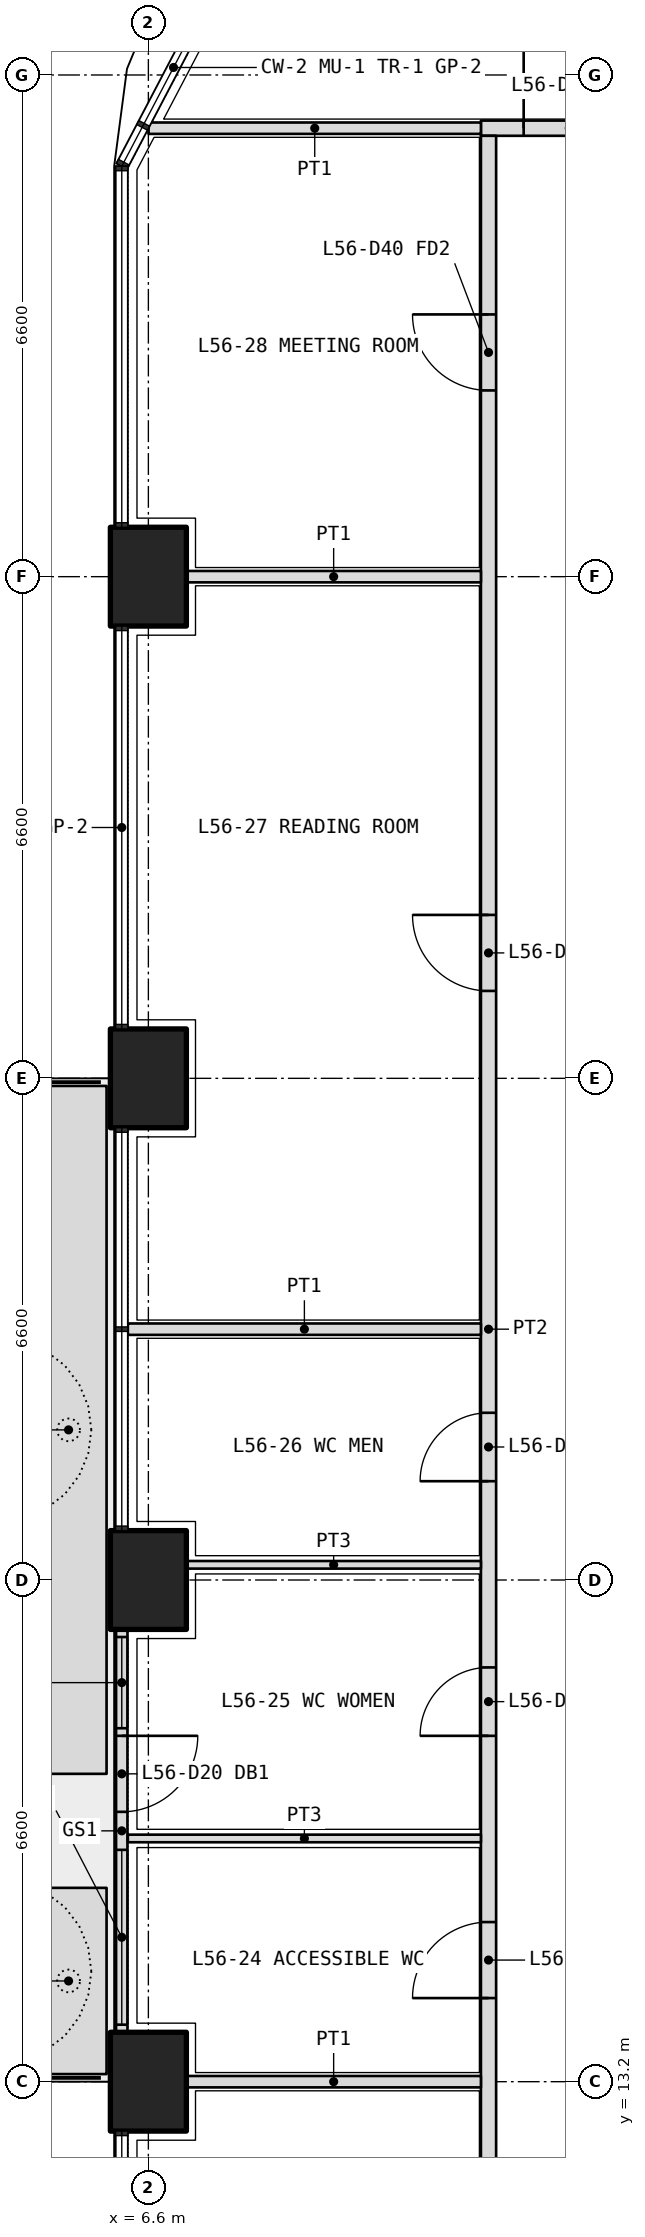
"""IFC4 building model, lengths in metres.
Left out: names, types, materials, properties, quantities, classifications, styles, units other than length and angle.
Written with IfcOpenShell. Run it as: python <this file> out.ifc"""

import sys

from ifc_helpers import new_model, si_unit, direction, frame, frame_2d, origin, origin_2d, place, context, subcontext, project, spatial, polyline, rectangle, outline, extrude, element, fill, save


model = new_model("IFC4")
c1 = context("Model", 3, precision=1e-05, world=origin(), true_north=direction((0.0, 1.0)))
c2 = subcontext(c1, "Body", "Model", "MODEL_VIEW")
j1 = project(units=[si_unit("LENGTHUNIT", "METRE"), si_unit("PLANEANGLEUNIT", "RADIAN")], contexts=[c1])
p1 = place(None, origin())
s1 = spatial("IfcSite", under=j1, at=p1, CompositionType="ELEMENT")
p2 = place(p1, origin())
s2 = spatial("IfcBuilding", under=s1, at=p2, CompositionType="ELEMENT")
p3 = place(p2, frame((0.0, 0.0, 246.0)))
s3 = spatial("IfcBuildingStorey", under=s2, at=p3, CompositionType="ELEMENT", Elevation=246.0)
for number, where, z_axis, x_axis in (
    (1, (6.6, 13.2, 0.0), (0.0, 0.0, 1.0), (0.0, 1.0, 0.0)),
    (2, (6.6, 19.8, 0.0), (0.0, 0.0, 1.0), (0.0, 1.0, 0.0)),
    (3, (6.6, 26.4, 0.0), (0.0, 0.0, 1.0), (0.0, 1.0, 0.0)),
    (4, (6.6, 33.0, 0.0), (0.0, 0.0, 1.0), (0.0, 1.0, 0.0)),
):
    element("IfcColumn", number, at=place(p3, frame(where, z_axis=z_axis, x_axis=x_axis)), inside=s3, PredefinedType="COLUMN", context=c2, shape_type="SweptSolid", body=[
        extrude(rectangle(XDim=1.3, YDim=1.0, at=origin_2d()), origin(), (0.0, 0.0, 1.0), 4.2),
    ])
p4 = place(p3, origin())
e5 = element("IfcWall", 5, at=p4, inside=s3, PredefinedType="USERDEFINED", context=c2, shape_type="SweptSolid", body=[
    extrude(outline(polyline([(5.05, 13.3), (6.05, 13.3), (6.05, 15.75), (5.05, 15.75), (5.05, 13.3)]), holes=[polyline([(5.2, 13.45), (5.9, 13.45), (5.9, 15.6), (5.2, 15.6), (5.2, 13.45)])]), origin(), (0.0, 0.0, 1.0), 1.05),
])
p5 = place(p3, origin())
e6 = element("IfcWall", 6, at=p5, inside=s3, PredefinedType="USERDEFINED", context=c2, shape_type="SweptSolid", body=[
    extrude(outline(polyline([(5.05, 17.25), (6.05, 17.25), (6.05, 26.3), (5.05, 26.3), (5.05, 17.25)]), holes=[polyline([(5.2, 17.4), (5.9, 17.4), (5.9, 26.15), (5.2, 26.15), (5.2, 17.4)])]), origin(), (0.0, 0.0, 1.0), 1.05),
])
p6 = place(p3, frame((6.25, 19.15, 0.0), z_axis=(0.0, 0.0, 1.0), x_axis=(0.0, -1.0, 0.0)))
e7 = element("IfcWall", 7, at=p6, inside=s3, PredefinedType="SOLIDWALL", context=c2, shape_type="SweptSolid", body=[
    extrude(rectangle(XDim=5.3, YDim=0.15, at=frame_2d((2.65, 0.0))), origin(), (0.0, 0.0, 1.0), 2.7),
])
p7 = place(p6, frame((1.4, 0.0, 0.0)))
e8 = element("IfcOpeningElement", 8, at=p7, cuts=e7, PredefinedType="OPENING", context=c2, shape_type="SweptSolid", body=[
    extrude(rectangle(XDim=1.0, YDim=2.4, at=frame_2d((0.5, 1.2))), frame((0.0, 0.085, 0.0), z_axis=(0.0, -1.0, 0.0), x_axis=(1.0, 0.0, 0.0)), (0.0, 0.0, 1.0), 0.17),
])
p8 = place(p6, frame((0.1, 0.0, 0.1)))
e9 = element("IfcOpeningElement", 9, at=p8, cuts=e7, PredefinedType="OPENING", context=c2, shape_type="SweptSolid", body=[
    extrude(rectangle(XDim=1.2, YDim=2.3, at=frame_2d((0.6, 1.15))), frame((0.0, 0.085, 0.0), z_axis=(0.0, -1.0, 0.0), x_axis=(1.0, 0.0, 0.0)), (0.0, 0.0, 1.0), 0.17),
])
p9 = place(p6, frame((2.9, 0.0, 0.1)))
e10 = element("IfcOpeningElement", 10, at=p9, cuts=e7, PredefinedType="OPENING", context=c2, shape_type="SweptSolid", body=[
    extrude(rectangle(XDim=2.3, YDim=2.3, at=frame_2d((1.15, 1.15))), frame((0.0, 0.085, 0.0), z_axis=(0.0, -1.0, 0.0), x_axis=(1.0, 0.0, 0.0)), (0.0, 0.0, 1.0), 0.17),
])
p10 = place(p3, frame((10.975, 38.9, 0.0), z_axis=(0.0, 0.0, 1.0), x_axis=(1.0, 0.0, 0.0)))
e11 = element("IfcWall", 11, at=p10, inside=s3, PredefinedType="PARTITIONING", context=c2, shape_type="SweptSolid", body=[
    extrude(rectangle(XDim=22.025, YDim=0.2, at=frame_2d((11.012, 0.0))), origin(), (0.0, 0.0, 1.0), 3.0),
])
p11 = place(p10, frame((0.562, 0.0, 0.0)))
e12 = element("IfcOpeningElement", 12, at=p11, cuts=e11, PredefinedType="OPENING", context=c2, shape_type="SweptSolid", body=[
    extrude(rectangle(XDim=1.2, YDim=2.1, at=frame_2d((0.6, 1.05))), frame((0.0, 0.11, 0.0), z_axis=(0.0, -1.0, 0.0), x_axis=(1.0, 0.0, 0.0)), (0.0, 0.0, 1.0), 0.22),
])
p12 = place(p10, frame((6.675, 0.0, 0.0)))
e13 = element("IfcOpeningElement", 13, at=p12, cuts=e11, PredefinedType="OPENING", context=c2, shape_type="SweptSolid", body=[
    extrude(rectangle(XDim=1.0, YDim=2.1, at=frame_2d((0.5, 1.05))), frame((0.0, 0.11, 0.0), z_axis=(0.0, -1.0, 0.0), x_axis=(1.0, 0.0, 0.0)), (0.0, 0.0, 1.0), 0.22),
])
p13 = place(p10, frame((13.725, 0.0, 0.0)))
e14 = element("IfcOpeningElement", 14, at=p13, cuts=e11, PredefinedType="OPENING", context=c2, shape_type="SweptSolid", body=[
    extrude(rectangle(XDim=1.0, YDim=2.1, at=frame_2d((0.5, 1.05))), frame((0.0, 0.11, 0.0), z_axis=(0.0, -1.0, 0.0), x_axis=(1.0, 0.0, 0.0)), (0.0, 0.0, 1.0), 0.22),
])
p14 = place(p10, frame((17.025, 0.0, 0.0)))
e15 = element("IfcOpeningElement", 15, at=p14, cuts=e11, PredefinedType="OPENING", context=c2, shape_type="SweptSolid", body=[
    extrude(rectangle(XDim=1.0, YDim=2.1, at=frame_2d((0.5, 1.05))), frame((0.0, 0.11, 0.0), z_axis=(0.0, -1.0, 0.0), x_axis=(1.0, 0.0, 0.0)), (0.0, 0.0, 1.0), 0.22),
])
p15 = place(p10, frame((19.875, 0.0, 0.0)))
e16 = element("IfcOpeningElement", 16, at=p15, cuts=e11, PredefinedType="OPENING", context=c2, shape_type="SweptSolid", body=[
    extrude(rectangle(XDim=1.0, YDim=2.1, at=frame_2d((0.5, 1.05))), frame((0.0, 0.11, 0.0), z_axis=(0.0, -1.0, 0.0), x_axis=(1.0, 0.0, 0.0)), (0.0, 0.0, 1.0), 0.22),
])
p16 = place(p3, frame((11.075, 7.4, 0.0), z_axis=(0.0, 0.0, 1.0), x_axis=(0.0, 1.0, 0.0)))
e17 = element("IfcWall", 17, at=p16, inside=s3, PredefinedType="PARTITIONING", context=c2, shape_type="SweptSolid", body=[
    extrude(rectangle(XDim=31.4, YDim=0.2, at=frame_2d((15.7, 0.0))), origin(), (0.0, 0.0, 1.0), 3.0),
])
p17 = place(p16, frame((2.35, 0.0, 0.0)))
e18 = element("IfcOpeningElement", 18, at=p17, cuts=e17, PredefinedType="OPENING", context=c2, shape_type="SweptSolid", body=[
    extrude(rectangle(XDim=1.0, YDim=2.1, at=frame_2d((0.5, 1.05))), frame((0.0, 0.11, 0.0), z_axis=(0.0, -1.0, 0.0), x_axis=(1.0, 0.0, 0.0)), (0.0, 0.0, 1.0), 0.22),
])
p18 = place(p16, frame((6.9, 0.0, 0.0)))
e19 = element("IfcOpeningElement", 19, at=p18, cuts=e17, PredefinedType="OPENING", context=c2, shape_type="SweptSolid", body=[
    extrude(rectangle(XDim=1.0, YDim=2.1, at=frame_2d((0.5, 1.05))), frame((0.0, 0.11, 0.0), z_axis=(0.0, -1.0, 0.0), x_axis=(1.0, 0.0, 0.0)), (0.0, 0.0, 1.0), 0.22),
])
p19 = place(p16, frame((10.35, 0.0, 0.0)))
e20 = element("IfcOpeningElement", 20, at=p19, cuts=e17, PredefinedType="OPENING", context=c2, shape_type="SweptSolid", body=[
    extrude(rectangle(XDim=0.9, YDim=2.1, at=frame_2d((0.45, 1.05))), frame((0.0, 0.11, 0.0), z_axis=(0.0, -1.0, 0.0), x_axis=(1.0, 0.0, 0.0)), (0.0, 0.0, 1.0), 0.22),
])
p20 = place(p16, frame((13.7, 0.0, 0.0)))
e21 = element("IfcOpeningElement", 21, at=p20, cuts=e17, PredefinedType="OPENING", context=c2, shape_type="SweptSolid", body=[
    extrude(rectangle(XDim=0.9, YDim=2.1, at=frame_2d((0.45, 1.05))), frame((0.0, 0.11, 0.0), z_axis=(0.0, -1.0, 0.0), x_axis=(1.0, 0.0, 0.0)), (0.0, 0.0, 1.0), 0.22),
])
p21 = place(p16, frame((20.15, 0.0, 0.0)))
e22 = element("IfcOpeningElement", 22, at=p21, cuts=e17, PredefinedType="OPENING", context=c2, shape_type="SweptSolid", body=[
    extrude(rectangle(XDim=1.0, YDim=2.1, at=frame_2d((0.5, 1.05))), frame((0.0, 0.11, 0.0), z_axis=(0.0, -1.0, 0.0), x_axis=(1.0, 0.0, 0.0)), (0.0, 0.0, 1.0), 0.22),
])
p22 = place(p16, frame((28.05, 0.0, 0.0)))
e23 = element("IfcOpeningElement", 23, at=p22, cuts=e17, PredefinedType="OPENING", context=c2, shape_type="SweptSolid", body=[
    extrude(rectangle(XDim=1.0, YDim=2.1, at=frame_2d((0.5, 1.05))), frame((0.0, 0.11, 0.0), z_axis=(0.0, -1.0, 0.0), x_axis=(1.0, 0.0, 0.0)), (0.0, 0.0, 1.0), 0.22),
])
p23 = place(p3, frame((6.603, 38.9, 0.0), z_axis=(0.0, 0.0, 1.0), x_axis=(1.0, 0.0, 0.0)))
e24 = element("IfcWall", 24, at=p23, inside=s3, PredefinedType="PARTITIONING", context=c2, shape_type="SweptSolid", body=[
    extrude(rectangle(XDim=4.373, YDim=0.15, at=frame_2d((2.186, 0.0))), origin(), (0.0, 0.0, 1.0), 2.7),
])
p24 = place(p3, frame((6.33, 16.4, 0.0), z_axis=(0.0, 0.0, 1.0), x_axis=(1.0, 0.0, 0.0)))
e25 = element("IfcWall", 25, at=p24, inside=s3, PredefinedType="PARTITIONING", context=c2, shape_type="SweptSolid", body=[
    extrude(rectangle(XDim=4.645, YDim=0.1, at=frame_2d((2.323, 0.0))), origin(), (0.0, 0.0, 1.0), 2.7),
])
p25 = place(p3, frame((7.1, 20.0, 0.0), z_axis=(0.0, 0.0, 1.0), x_axis=(1.0, 0.0, 0.0)))
e26 = element("IfcWall", 26, at=p25, inside=s3, PredefinedType="PARTITIONING", context=c2, shape_type="SweptSolid", body=[
    extrude(rectangle(XDim=3.875, YDim=0.1, at=frame_2d((1.938, 0.0))), origin(), (0.0, 0.0, 1.0), 3.0),
])
p26 = place(p3, frame((6.33, 23.1, 0.0), z_axis=(0.0, 0.0, 1.0), x_axis=(1.0, 0.0, 0.0)))
e27 = element("IfcWall", 27, at=p26, inside=s3, PredefinedType="PARTITIONING", context=c2, shape_type="SweptSolid", body=[
    extrude(rectangle(XDim=4.645, YDim=0.15, at=frame_2d((2.323, 0.0))), origin(), (0.0, 0.0, 1.0), 2.7),
])
for number, where, z_axis, x_axis in (
    (28, (7.1, 13.2, 0.0), (0.0, 0.0, 1.0), (1.0, 0.0, 0.0)),
    (29, (7.1, 33.0, 0.0), (0.0, 0.0, 1.0), (1.0, 0.0, 0.0)),
):
    element("IfcWall", number, at=place(p3, frame(where, z_axis=z_axis, x_axis=x_axis)), inside=s3, PredefinedType="PARTITIONING", context=c2, shape_type="SweptSolid", body=[
        extrude(rectangle(XDim=3.875, YDim=0.15, at=frame_2d((1.938, 0.0))), origin(), (0.0, 0.0, 1.0), 3.0),
    ])
p27 = place(p7, origin())
e30 = element("IfcDoor", 30, at=p27, inside=s3, OperationType="SINGLE_SWING_LEFT", PredefinedType="DOOR", context=c2, shape_type="SweptSolid", body=[
    extrude(rectangle(XDim=1.0, YDim=2.4, at=frame_2d((0.5, 1.2))), frame((0.0, 0.025, 0.0), z_axis=(0.0, -1.0, 0.0), x_axis=(1.0, 0.0, 0.0)), (0.0, 0.0, 1.0), 0.05),
])
fill(e8, e30)
p28 = place(p8, origin())
e31 = element("IfcWindow", 31, at=p28, inside=s3, PartitioningType="SINGLE_PANEL", PredefinedType="WINDOW", context=c2, shape_type="SweptSolid", body=[
    extrude(rectangle(XDim=1.2, YDim=2.3, at=frame_2d((0.6, 1.15))), frame((0.0, 0.03, 0.0), z_axis=(0.0, -1.0, 0.0), x_axis=(1.0, 0.0, 0.0)), (0.0, 0.0, 1.0), 0.06),
])
fill(e9, e31)
p29 = place(p9, origin())
e32 = element("IfcWindow", 32, at=p29, inside=s3, PartitioningType="SINGLE_PANEL", PredefinedType="WINDOW", context=c2, shape_type="SweptSolid", body=[
    extrude(rectangle(XDim=2.3, YDim=2.3, at=frame_2d((1.15, 1.15))), frame((0.0, 0.03, 0.0), z_axis=(0.0, -1.0, 0.0), x_axis=(1.0, 0.0, 0.0)), (0.0, 0.0, 1.0), 0.06),
])
fill(e10, e32)
p30 = place(p11, origin())
e33 = element("IfcDoor", 33, at=p30, inside=s3, OperationType="DOUBLE_DOOR_SINGLE_SWING", PredefinedType="DOOR", context=c2, shape_type="SweptSolid", body=[
    extrude(rectangle(XDim=1.2, YDim=2.1, at=frame_2d((0.6, 1.05))), frame((0.0, 0.025, 0.0), z_axis=(0.0, -1.0, 0.0), x_axis=(1.0, 0.0, 0.0)), (0.0, 0.0, 1.0), 0.05),
])
fill(e12, e33)
p31 = place(p18, origin())
e34 = element("IfcDoor", 34, at=p31, inside=s3, OperationType="SINGLE_SWING_LEFT", PredefinedType="DOOR", context=c2, shape_type="SweptSolid", body=[
    extrude(rectangle(XDim=1.0, YDim=2.1, at=frame_2d((0.5, 1.05))), frame((0.0, 0.025, 0.0), z_axis=(0.0, -1.0, 0.0), x_axis=(1.0, 0.0, 0.0)), (0.0, 0.0, 1.0), 0.05),
])
fill(e19, e34)
p32 = place(p19, origin())
e35 = element("IfcDoor", 35, at=p32, inside=s3, OperationType="SINGLE_SWING_LEFT", PredefinedType="DOOR", context=c2, shape_type="SweptSolid", body=[
    extrude(rectangle(XDim=0.9, YDim=2.1, at=frame_2d((0.45, 1.05))), frame((0.0, 0.025, 0.0), z_axis=(0.0, -1.0, 0.0), x_axis=(1.0, 0.0, 0.0)), (0.0, 0.0, 1.0), 0.05),
])
fill(e20, e35)
p33 = place(p20, origin())
e36 = element("IfcDoor", 36, at=p33, inside=s3, OperationType="SINGLE_SWING_LEFT", PredefinedType="DOOR", context=c2, shape_type="SweptSolid", body=[
    extrude(rectangle(XDim=0.9, YDim=2.1, at=frame_2d((0.45, 1.05))), frame((0.0, 0.025, 0.0), z_axis=(0.0, -1.0, 0.0), x_axis=(1.0, 0.0, 0.0)), (0.0, 0.0, 1.0), 0.05),
])
fill(e21, e36)
p34 = place(p21, origin())
e37 = element("IfcDoor", 37, at=p34, inside=s3, OperationType="SINGLE_SWING_RIGHT", PredefinedType="DOOR", context=c2, shape_type="SweptSolid", body=[
    extrude(rectangle(XDim=1.0, YDim=2.1, at=frame_2d((0.5, 1.05))), frame((0.0, 0.025, 0.0), z_axis=(0.0, -1.0, 0.0), x_axis=(1.0, 0.0, 0.0)), (0.0, 0.0, 1.0), 0.05),
])
fill(e22, e37)
p35 = place(p22, origin())
e38 = element("IfcDoor", 38, at=p35, inside=s3, OperationType="SINGLE_SWING_RIGHT", PredefinedType="DOOR", context=c2, shape_type="SweptSolid", body=[
    extrude(rectangle(XDim=1.0, YDim=2.1, at=frame_2d((0.5, 1.05))), frame((0.0, 0.025, 0.0), z_axis=(0.0, -1.0, 0.0), x_axis=(1.0, 0.0, 0.0)), (0.0, 0.0, 1.0), 0.05),
])
fill(e23, e38)
save(model, sys.argv[1])
